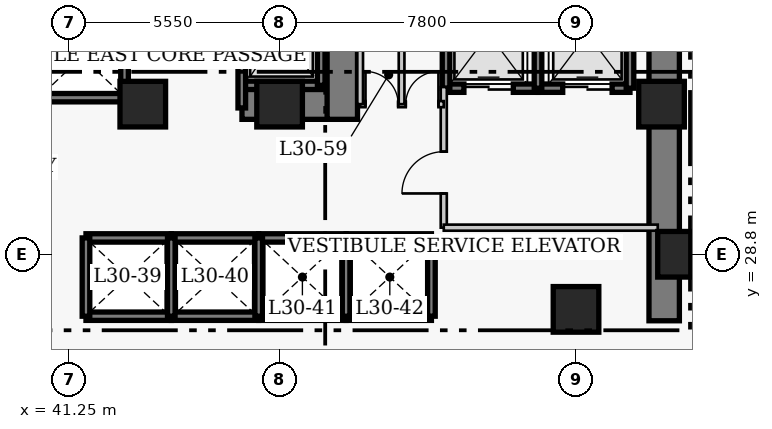
"""IFC4 building model, lengths in metres.
Left out: names, types, materials, properties, quantities, classifications, styles, units other than length and angle.
Written with IfcOpenShell. Run it as: python <this file> out.ifc"""

import sys

from ifc_helpers import new_model, si_unit, direction, frame, frame_2d, origin, origin_2d, place, context, subcontext, project, spatial, rectangle, extrude, element, fill, save


model = new_model("IFC4")
c1 = context("Model", 3, precision=1e-05, world=origin(), true_north=direction((0.0, 1.0)))
c2 = subcontext(c1, "Body", "Model", "MODEL_VIEW")
j1 = project(units=[si_unit("LENGTHUNIT", "METRE"), si_unit("PLANEANGLEUNIT", "RADIAN")], contexts=[c1])
p1 = place(None, origin())
s1 = spatial("IfcSite", under=j1, at=p1, CompositionType="ELEMENT")
p2 = place(p1, origin())
s2 = spatial("IfcBuilding", under=s1, at=p2, CompositionType="ELEMENT")
p3 = place(p2, frame((0.0, 0.0, 122.2)))
s3 = spatial("IfcBuildingStorey", under=s2, at=p3, CompositionType="ELEMENT", Elevation=122.2)
p4 = place(p3, frame((56.92, 27.05, 0.0), z_axis=(0.0, 0.0, 1.0), x_axis=(0.0, 1.0, 0.0)))
e1 = element("IfcWall", 1, at=p4, inside=s3, PredefinedType="SHEAR", context=c2, shape_type="SweptSolid", body=[
    extrude(rectangle(XDim=13.67, YDim=0.8, at=frame_2d((6.835, 0.0))), origin(), (0.0, 0.0, 1.0), 3.8),
])
p5 = place(p3, frame((45.81, 32.75, 0.0), z_axis=(0.0, 0.0, 1.0), x_axis=(1.0, 0.0, 0.0)))
e2 = element("IfcWall", 2, at=p5, inside=s3, PredefinedType="SHEAR", context=c2, shape_type="SweptSolid", body=[
    extrude(rectangle(XDim=2.64, YDim=0.8, at=frame_2d((1.32, 0.0))), origin(), (0.0, 0.0, 1.0), 3.8),
])
p6 = place(p3, frame((48.45, 32.35, 0.0), z_axis=(0.0, 0.0, 1.0), x_axis=(0.0, 1.0, 0.0)))
e3 = element("IfcWall", 3, at=p6, inside=s3, PredefinedType="SHEAR", context=c2, shape_type="SweptSolid", body=[
    extrude(rectangle(XDim=7.97, YDim=0.8, at=frame_2d((3.985, 0.0))), origin(), (0.0, 0.0, 1.0), 3.8),
])
p7 = place(p6, frame((5.85, 0.0, 0.0)))
e4 = element("IfcOpeningElement", 4, at=p7, cuts=e3, PredefinedType="OPENING", context=c2, shape_type="SweptSolid", body=[
    extrude(rectangle(XDim=1.1, YDim=2.15, at=frame_2d((0.55, 1.075))), frame((0.0, 0.41, 0.0), z_axis=(0.0, -1.0, 0.0), x_axis=(1.0, 0.0, 0.0)), (0.0, 0.0, 1.0), 0.82),
])
for number, where, z_axis, x_axis in (
    (5, (57.35, 28.8, 0.0), (0.0, 0.0, 1.0), (1.0, 0.0, 0.0)),
    (6, (43.2, 32.75, 0.0), (0.0, 0.0, 1.0), (1.0, 0.0, 0.0)),
    (7, (46.8, 32.75, 0.0), (0.0, 0.0, 1.0), (1.0, 0.0, 0.0)),
    (8, (54.6, 27.35, 0.0), (0.0, 0.0, 1.0), (1.0, 0.0, 0.0)),
    (9, (56.85, 32.75, 0.0), (0.0, 0.0, 1.0), (1.0, 0.0, 0.0)),
):
    element("IfcColumn", number, at=place(p3, frame(where, z_axis=z_axis, x_axis=x_axis)), inside=s3, PredefinedType="COLUMN", context=c2, shape_type="SweptSolid", body=[
        extrude(rectangle(XDim=1.2, YDim=1.2, at=origin_2d()), origin(), (0.0, 0.0, 1.0), 3.8),
    ])
for number, where, z_axis, x_axis in (
    (10, (41.705, 29.23, 0.0), (0.0, 0.0, 1.0), (1.0, 0.0, 0.0)),
    (11, (41.705, 27.17, 0.0), (0.0, 0.0, 1.0), (1.0, 0.0, 0.0)),
):
    element("IfcWall", number, at=place(p3, frame(where, z_axis=z_axis, x_axis=x_axis)), inside=s3, PredefinedType="SHEAR", context=c2, shape_type="SweptSolid", body=[
        extrude(rectangle(XDim=2.245, YDim=0.22, at=frame_2d((1.123, 0.0))), origin(), (0.0, 0.0, 1.0), 3.8),
    ])
p8 = place(p3, frame((41.705, 27.17, 0.0), z_axis=(0.0, 0.0, 1.0), x_axis=(0.0, 1.0, 0.0)))
e12 = element("IfcWall", 12, at=p8, inside=s3, PredefinedType="SHEAR", context=c2, shape_type="SweptSolid", body=[
    extrude(rectangle(XDim=2.06, YDim=0.2, at=frame_2d((1.03, 0.0))), origin(), (0.0, 0.0, 1.0), 3.8),
])
for number, where, z_axis, x_axis in (
    (13, (43.95, 29.23, 0.0), (0.0, 0.0, 1.0), (1.0, 0.0, 0.0)),
    (14, (43.95, 27.17, 0.0), (0.0, 0.0, 1.0), (1.0, 0.0, 0.0)),
):
    element("IfcWall", number, at=place(p3, frame(where, z_axis=z_axis, x_axis=x_axis)), inside=s3, PredefinedType="SHEAR", context=c2, shape_type="SweptSolid", body=[
        extrude(rectangle(XDim=2.3, YDim=0.22, at=frame_2d((1.15, 0.0))), origin(), (0.0, 0.0, 1.0), 3.8),
    ])
p9 = place(p3, frame((43.95, 27.17, 0.0), z_axis=(0.0, 0.0, 1.0), x_axis=(0.0, 1.0, 0.0)))
e15 = element("IfcWall", 15, at=p9, inside=s3, PredefinedType="SHEAR", context=c2, shape_type="SweptSolid", body=[
    extrude(rectangle(XDim=2.06, YDim=0.2, at=frame_2d((1.03, 0.0))), origin(), (0.0, 0.0, 1.0), 3.8),
])
for number, where, z_axis, x_axis in (
    (16, (46.25, 29.23, 0.0), (0.0, 0.0, 1.0), (1.0, 0.0, 0.0)),
    (17, (46.25, 27.17, 0.0), (0.0, 0.0, 1.0), (1.0, 0.0, 0.0)),
):
    element("IfcWall", number, at=place(p3, frame(where, z_axis=z_axis, x_axis=x_axis)), inside=s3, PredefinedType="SHEAR", context=c2, shape_type="SweptSolid", body=[
        extrude(rectangle(XDim=2.3, YDim=0.22, at=frame_2d((1.15, 0.0))), origin(), (0.0, 0.0, 1.0), 3.8),
    ])
p10 = place(p3, frame((46.25, 27.17, 0.0), z_axis=(0.0, 0.0, 1.0), x_axis=(0.0, 1.0, 0.0)))
e18 = element("IfcWall", 18, at=p10, inside=s3, PredefinedType="SHEAR", context=c2, shape_type="SweptSolid", body=[
    extrude(rectangle(XDim=2.06, YDim=0.2, at=frame_2d((1.03, 0.0))), origin(), (0.0, 0.0, 1.0), 3.8),
])
for number, where, z_axis, x_axis in (
    (19, (48.55, 29.23, 0.0), (0.0, 0.0, 1.0), (1.0, 0.0, 0.0)),
    (20, (48.55, 27.17, 0.0), (0.0, 0.0, 1.0), (1.0, 0.0, 0.0)),
):
    element("IfcWall", number, at=place(p3, frame(where, z_axis=z_axis, x_axis=x_axis)), inside=s3, PredefinedType="SHEAR", context=c2, shape_type="SweptSolid", body=[
        extrude(rectangle(XDim=2.245, YDim=0.22, at=frame_2d((1.123, 0.0))), origin(), (0.0, 0.0, 1.0), 3.8),
    ])
for number, where, z_axis, x_axis in (
    (21, (48.55, 27.17, 0.0), (0.0, 0.0, 1.0), (0.0, 1.0, 0.0)),
    (22, (50.795, 27.17, 0.0), (0.0, 0.0, 1.0), (0.0, 1.0, 0.0)),
):
    element("IfcWall", number, at=place(p3, frame(where, z_axis=z_axis, x_axis=x_axis)), inside=s3, PredefinedType="SHEAR", context=c2, shape_type="SweptSolid", body=[
        extrude(rectangle(XDim=2.06, YDim=0.2, at=frame_2d((1.03, 0.0))), origin(), (0.0, 0.0, 1.0), 3.8),
    ])
p11 = place(p3, frame((40.4, 32.92, 0.0), z_axis=(0.0, 0.0, 1.0), x_axis=(1.0, 0.0, 0.0)))
e23 = element("IfcWall", 23, at=p11, inside=s3, PredefinedType="SHEAR", context=c2, shape_type="SweptSolid", body=[
    extrude(rectangle(XDim=2.32, YDim=0.22, at=frame_2d((1.16, 0.0))), origin(), (0.0, 0.0, 1.0), 3.8),
])
p12 = place(p3, frame((42.72, 32.92, 0.0), z_axis=(0.0, 0.0, 1.0), x_axis=(0.0, 1.0, 0.0)))
e24 = element("IfcWall", 24, at=p12, inside=s3, PredefinedType="SHEAR", context=c2, shape_type="SweptSolid", body=[
    extrude(rectangle(XDim=2.16, YDim=0.2, at=frame_2d((1.08, 0.0))), origin(), (0.0, 0.0, 1.0), 3.8),
])
p13 = place(p3, frame((51.18, 33.17, 0.0), z_axis=(0.0, 0.0, 1.0), x_axis=(1.0, 0.0, 0.0)))
e25 = element("IfcWall", 25, at=p13, inside=s3, PredefinedType="SHEAR", context=c2, shape_type="SweptSolid", body=[
    extrude(rectangle(XDim=2.42, YDim=0.22, at=frame_2d((1.21, 0.0))), origin(), (0.0, 0.0, 1.0), 3.8),
])
p14 = place(p13, frame((0.47, 0.0, 0.0)))
e26 = element("IfcOpeningElement", 26, at=p14, cuts=e25, PredefinedType="OPENING", context=c2, shape_type="SweptSolid", body=[
    extrude(rectangle(XDim=1.3, YDim=2.15, at=frame_2d((0.65, 1.075))), frame((0.0, 0.12, 0.0), z_axis=(0.0, -1.0, 0.0), x_axis=(1.0, 0.0, 0.0)), (0.0, 0.0, 1.0), 0.24),
])
p15 = place(p3, frame((51.18, 33.17, 0.0), z_axis=(0.0, 0.0, 1.0), x_axis=(0.0, 1.0, 0.0)))
e27 = element("IfcWall", 27, at=p15, inside=s3, PredefinedType="SHEAR", context=c2, shape_type="SweptSolid", body=[
    extrude(rectangle(XDim=2.86, YDim=0.2, at=frame_2d((1.43, 0.0))), origin(), (0.0, 0.0, 1.0), 3.8),
])
p16 = place(p3, frame((53.6, 33.17, 0.0), z_axis=(0.0, 0.0, 1.0), x_axis=(1.0, 0.0, 0.0)))
e28 = element("IfcWall", 28, at=p16, inside=s3, PredefinedType="SHEAR", context=c2, shape_type="SweptSolid", body=[
    extrude(rectangle(XDim=2.42, YDim=0.22, at=frame_2d((1.21, 0.0))), origin(), (0.0, 0.0, 1.0), 3.8),
])
p17 = place(p16, frame((0.65, 0.0, 0.0)))
e29 = element("IfcOpeningElement", 29, at=p17, cuts=e28, PredefinedType="OPENING", context=c2, shape_type="SweptSolid", body=[
    extrude(rectangle(XDim=1.3, YDim=2.15, at=frame_2d((0.65, 1.075))), frame((0.0, 0.12, 0.0), z_axis=(0.0, -1.0, 0.0), x_axis=(1.0, 0.0, 0.0)), (0.0, 0.0, 1.0), 0.24),
])
for number, where, z_axis, x_axis in (
    (30, (53.6, 33.17, 0.0), (0.0, 0.0, 1.0), (0.0, 1.0, 0.0)),
    (31, (56.02, 33.17, 0.0), (0.0, 0.0, 1.0), (0.0, 1.0, 0.0)),
):
    element("IfcWall", number, at=place(p3, frame(where, z_axis=z_axis, x_axis=x_axis)), inside=s3, PredefinedType="SHEAR", context=c2, shape_type="SweptSolid", body=[
        extrude(rectangle(XDim=2.86, YDim=0.2, at=frame_2d((1.43, 0.0))), origin(), (0.0, 0.0, 1.0), 3.8),
    ])
p18 = place(p3, frame((45.805, 33.245, 0.0), z_axis=(0.0, 0.0, 1.0), x_axis=(1.0, 0.0, 0.0)))
e32 = element("IfcWall", 32, at=p18, inside=s3, PredefinedType="SHEAR", context=c2, shape_type="SweptSolid", body=[
    extrude(rectangle(XDim=2.09, YDim=0.22, at=frame_2d((1.045, 0.0))), origin(), (0.0, 0.0, 1.0), 3.8),
])
p19 = place(p3, frame((45.805, 32.65, 0.0), z_axis=(0.0, 0.0, 1.0), x_axis=(0.0, 1.0, 0.0)))
e33 = element("IfcWall", 33, at=p19, inside=s3, PredefinedType="SHEAR", context=c2, shape_type="SweptSolid", body=[
    extrude(rectangle(XDim=3.505, YDim=0.2, at=frame_2d((1.752, 0.0))), origin(), (0.0, 0.0, 1.0), 3.8),
])
p20 = place(p3, frame((47.895, 33.245, 0.0), z_axis=(0.0, 0.0, 1.0), x_axis=(0.0, 1.0, 0.0)))
e34 = element("IfcWall", 34, at=p20, inside=s3, PredefinedType="SHEAR", context=c2, shape_type="SweptSolid", body=[
    extrude(rectangle(XDim=2.91, YDim=0.2, at=frame_2d((1.455, 0.0))), origin(), (0.0, 0.0, 1.0), 3.8),
])
p21 = place(p3, frame((51.12, 29.5, 0.0), z_axis=(0.0, 0.0, 1.0), x_axis=(0.0, 1.0, 0.0)))
e35 = element("IfcWall", 35, at=p21, inside=s3, PredefinedType="PARTITIONING", context=c2, shape_type="SweptSolid", body=[
    extrude(rectangle(XDim=3.7, YDim=0.16, at=frame_2d((1.85, 0.0))), origin(), (0.0, 0.0, 1.0), 3.54),
])
p22 = place(p21, frame((0.9, 0.0, 0.0)))
e36 = element("IfcOpeningElement", 36, at=p22, cuts=e35, PredefinedType="OPENING", context=c2, shape_type="SweptSolid", body=[
    extrude(rectangle(XDim=1.1, YDim=2.15, at=frame_2d((0.55, 1.075))), frame((0.0, 0.09, 0.0), z_axis=(0.0, -1.0, 0.0), x_axis=(1.0, 0.0, 0.0)), (0.0, 0.0, 1.0), 0.18),
])
p23 = place(p3, frame((51.12, 29.5, 0.0), z_axis=(0.0, 0.0, 1.0), x_axis=(1.0, 0.0, 0.0)))
e37 = element("IfcWall", 37, at=p23, inside=s3, PredefinedType="PARTITIONING", context=c2, shape_type="SweptSolid", body=[
    extrude(rectangle(XDim=5.63, YDim=0.16, at=frame_2d((2.815, 0.0))), origin(), (0.0, 0.0, 1.0), 3.54),
])
p24 = place(p3, frame((48.92, 32.75, 0.0), z_axis=(0.0, 0.0, 1.0), x_axis=(1.0, 0.0, 0.0)))
e38 = element("IfcWall", 38, at=p24, inside=s3, PredefinedType="PARTITIONING", context=c2, shape_type="SweptSolid", body=[
    extrude(rectangle(XDim=2.2, YDim=0.16, at=frame_2d((1.1, 0.0))), origin(), (0.0, 0.0, 1.0), 3.54),
])
p25 = place(p24, frame((0.14, 0.0, 0.0)))
e39 = element("IfcOpeningElement", 39, at=p25, cuts=e38, PredefinedType="OPENING", context=c2, shape_type="SweptSolid", body=[
    extrude(rectangle(XDim=0.86, YDim=2.05, at=frame_2d((0.43, 1.025))), frame((0.0, 0.09, 0.0), z_axis=(0.0, -1.0, 0.0), x_axis=(1.0, 0.0, 0.0)), (0.0, 0.0, 1.0), 0.18),
])
p26 = place(p24, frame((1.2, 0.0, 0.0)))
e40 = element("IfcOpeningElement", 40, at=p26, cuts=e38, PredefinedType="OPENING", context=c2, shape_type="SweptSolid", body=[
    extrude(rectangle(XDim=0.86, YDim=2.05, at=frame_2d((0.43, 1.025))), frame((0.0, 0.09, 0.0), z_axis=(0.0, -1.0, 0.0), x_axis=(1.0, 0.0, 0.0)), (0.0, 0.0, 1.0), 0.18),
])
for number, where, z_axis, x_axis in (
    (41, (48.92, 32.75, 0.0), (0.0, 0.0, 1.0), (0.0, 1.0, 0.0)),
    (42, (50.01, 32.75, 0.0), (0.0, 0.0, 1.0), (0.0, 1.0, 0.0)),
):
    element("IfcWall", number, at=place(p3, frame(where, z_axis=z_axis, x_axis=x_axis)), inside=s3, PredefinedType="PARTITIONING", context=c2, shape_type="SweptSolid", body=[
        extrude(rectangle(XDim=3.62, YDim=0.15, at=frame_2d((1.81, 0.0))), origin(), (0.0, 0.0, 1.0), 3.54),
    ])
p27 = place(p14, origin())
e43 = element("IfcDoor", 43, at=p27, inside=s3, OperationType="DOUBLE_DOOR_SLIDING", PredefinedType="DOOR", context=c2, shape_type="SweptSolid", body=[
    extrude(rectangle(XDim=1.3, YDim=2.15, at=frame_2d((0.65, 1.075))), frame((0.0, 0.025, 0.0), z_axis=(0.0, -1.0, 0.0), x_axis=(1.0, 0.0, 0.0)), (0.0, 0.0, 1.0), 0.05),
])
fill(e26, e43)
p28 = place(p17, origin())
e44 = element("IfcDoor", 44, at=p28, inside=s3, OperationType="DOUBLE_DOOR_SLIDING", PredefinedType="DOOR", context=c2, shape_type="SweptSolid", body=[
    extrude(rectangle(XDim=1.3, YDim=2.15, at=frame_2d((0.65, 1.075))), frame((0.0, 0.025, 0.0), z_axis=(0.0, -1.0, 0.0), x_axis=(1.0, 0.0, 0.0)), (0.0, 0.0, 1.0), 0.05),
])
fill(e29, e44)
p29 = place(p22, origin())
e45 = element("IfcDoor", 45, at=p29, inside=s3, OperationType="SINGLE_SWING_LEFT", PredefinedType="DOOR", context=c2, shape_type="SweptSolid", body=[
    extrude(rectangle(XDim=1.1, YDim=2.15, at=frame_2d((0.55, 1.075))), frame((0.0, 0.025, 0.0), z_axis=(0.0, -1.0, 0.0), x_axis=(1.0, 0.0, 0.0)), (0.0, 0.0, 1.0), 0.05),
])
fill(e36, e45)
p30 = place(p25, origin())
e46 = element("IfcDoor", 46, at=p30, inside=s3, OperationType="SINGLE_SWING_LEFT", PredefinedType="DOOR", context=c2, shape_type="SweptSolid", body=[
    extrude(rectangle(XDim=0.86, YDim=2.05, at=frame_2d((0.43, 1.025))), frame((0.0, 0.025, 0.0), z_axis=(0.0, -1.0, 0.0), x_axis=(1.0, 0.0, 0.0)), (0.0, 0.0, 1.0), 0.05),
])
fill(e39, e46)
p31 = place(p26, origin())
e47 = element("IfcDoor", 47, at=p31, inside=s3, OperationType="SINGLE_SWING_RIGHT", PredefinedType="DOOR", context=c2, shape_type="SweptSolid", body=[
    extrude(rectangle(XDim=0.86, YDim=2.05, at=frame_2d((0.43, 1.025))), frame((0.0, 0.025, 0.0), z_axis=(0.0, -1.0, 0.0), x_axis=(1.0, 0.0, 0.0)), (0.0, 0.0, 1.0), 0.05),
])
fill(e40, e47)
save(model, sys.argv[1])
